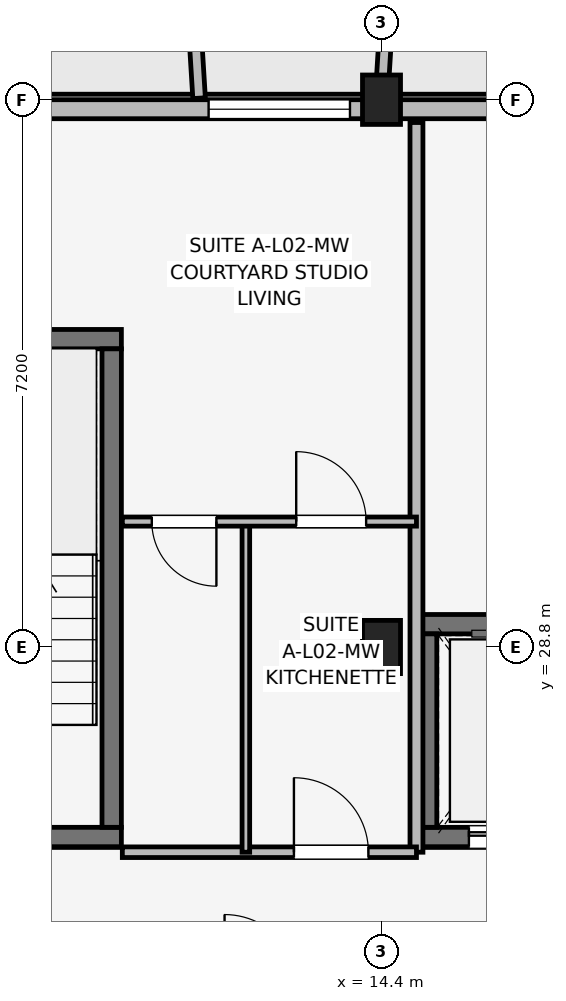
"""IFC4 building model, lengths in metres.
Left out: names, types, materials, properties, quantities, classifications, styles, units other than length and angle.
Written with IfcOpenShell. Run it as: python <this file> out.ifc"""

import sys

from ifc_helpers import new_model, si_unit, direction, frame, frame_2d, origin, origin_2d, place, context, subcontext, project, spatial, rectangle, extrude, element, fill, save


model = new_model("IFC4")
c1 = context("Model", 3, precision=1e-05, world=origin(), true_north=direction((0.0, 1.0)))
c2 = subcontext(c1, "Body", "Model", "MODEL_VIEW")
j1 = project(units=[si_unit("LENGTHUNIT", "METRE"), si_unit("PLANEANGLEUNIT", "RADIAN")], contexts=[c1])
p1 = place(None, origin())
s1 = spatial("IfcSite", under=j1, at=p1, CompositionType="ELEMENT")
p2 = place(p1, origin())
s2 = spatial("IfcBuilding", under=s1, at=p2, CompositionType="ELEMENT")
p3 = place(p2, frame((0.0, 0.0, 8.7)))
s3 = spatial("IfcBuildingStorey", under=s2, at=p3, CompositionType="ELEMENT", Elevation=8.7)
p4 = place(p3, frame((14.4, 28.8, 0.0), z_axis=(0.0, 0.0, 1.0), x_axis=(1.0, 0.0, 0.0)))
e1 = element("IfcColumn", 1, at=p4, inside=s3, PredefinedType="COLUMN", context=c2, shape_type="SweptSolid", body=[
    extrude(rectangle(XDim=0.5, YDim=0.7, at=origin_2d()), origin(), (0.0, 0.0, 1.0), 3.15),
])
p5 = place(p3, frame((14.4, 36.0, 0.0), z_axis=(0.0, 0.0, 1.0), x_axis=(1.0, 0.0, 0.0)))
e2 = element("IfcColumn", 2, at=p5, inside=s3, PredefinedType="COLUMN", context=c2, shape_type="SweptSolid", body=[
    extrude(rectangle(XDim=0.5, YDim=0.65, at=origin_2d()), origin(), (0.0, 0.0, 1.0), 3.15),
])
p6 = place(p3, frame((7.673, 26.3, 0.0), z_axis=(0.0, 0.0, 1.0), x_axis=(1.0, 0.0, 0.0)))
e3 = element("IfcWall", 3, at=p6, inside=s3, PredefinedType="SHEAR", context=c2, shape_type="SweptSolid", body=[
    extrude(rectangle(XDim=3.305, YDim=0.255, at=frame_2d((1.652, 0.0))), origin(), (0.0, 0.0, 1.0), 3.15),
])
p7 = place(p6, frame((2.177, 0.0, 0.0), z_axis=(0.0, 0.0, 1.0), x_axis=(-1.0, 0.0, 0.0)))
e4 = element("IfcOpeningElement", 4, at=p7, cuts=e3, PredefinedType="OPENING", context=c2, shape_type="SweptSolid", body=[
    extrude(rectangle(XDim=1.05, YDim=2.12, at=frame_2d((0.525, 1.06))), frame((0.0, 0.137, 0.0), z_axis=(0.0, -1.0, 0.0), x_axis=(1.0, 0.0, 0.0)), (0.0, 0.0, 1.0), 0.275),
])
p8 = place(p3, frame((7.673, 32.85, 0.0), z_axis=(0.0, 0.0, 1.0), x_axis=(1.0, 0.0, 0.0)))
e5 = element("IfcWall", 5, at=p8, inside=s3, PredefinedType="SHEAR", context=c2, shape_type="SweptSolid", body=[
    extrude(rectangle(XDim=3.305, YDim=0.255, at=frame_2d((1.652, 0.0))), origin(), (0.0, 0.0, 1.0), 3.15),
])
p9 = place(p3, frame((10.85, 26.427, 0.0), z_axis=(0.0, 0.0, 1.0), x_axis=(0.0, 1.0, 0.0)))
e6 = element("IfcWall", 6, at=p9, inside=s3, PredefinedType="SHEAR", context=c2, shape_type="SweptSolid", body=[
    extrude(rectangle(XDim=6.295, YDim=0.255, at=frame_2d((3.147, 0.0))), origin(), (0.0, 0.0, 1.0), 3.15),
])
p10 = place(p3, frame((14.873, 26.3, 0.0), z_axis=(0.0, 0.0, 1.0), x_axis=(1.0, 0.0, 0.0)))
e7 = element("IfcWall", 7, at=p10, inside=s3, PredefinedType="SHEAR", context=c2, shape_type="SweptSolid", body=[
    extrude(rectangle(XDim=2.455, YDim=0.255, at=frame_2d((1.228, 0.0))), origin(), (0.0, 0.0, 1.0), 3.15),
])
p11 = place(p10, frame((0.677, 0.0, 0.0)))
e8 = element("IfcOpeningElement", 8, at=p11, cuts=e7, PredefinedType="OPENING", context=c2, shape_type="SweptSolid", body=[
    extrude(rectangle(XDim=1.1, YDim=2.15, at=frame_2d((0.55, 1.075))), frame((0.0, 0.137, 0.0), z_axis=(0.0, -1.0, 0.0), x_axis=(1.0, 0.0, 0.0)), (0.0, 0.0, 1.0), 0.275),
])
p12 = place(p3, frame((14.873, 29.1, 0.0), z_axis=(0.0, 0.0, 1.0), x_axis=(1.0, 0.0, 0.0)))
e9 = element("IfcWall", 9, at=p12, inside=s3, PredefinedType="SHEAR", context=c2, shape_type="SweptSolid", body=[
    extrude(rectangle(XDim=2.455, YDim=0.255, at=frame_2d((1.228, 0.0))), origin(), (0.0, 0.0, 1.0), 3.15),
])
p13 = place(p3, frame((15.0, 26.427, 0.0), z_axis=(0.0, 0.0, 1.0), x_axis=(0.0, 1.0, 0.0)))
e10 = element("IfcWall", 10, at=p13, inside=s3, PredefinedType="SHEAR", context=c2, shape_type="SweptSolid", body=[
    extrude(rectangle(XDim=2.545, YDim=0.255, at=frame_2d((1.272, 0.0))), origin(), (0.0, 0.0, 1.0), 3.15),
])
p14 = place(p3, frame((32.6, 35.875, 0.0), z_axis=(0.0, 0.0, 1.0), x_axis=(-1.0, 0.0, 0.0)))
e11 = element("IfcWall", 11, at=p14, inside=s3, PredefinedType="SOLIDWALL", context=c2, shape_type="SweptSolid", body=[
    extrude(rectangle(XDim=29.2, YDim=0.25, at=frame_2d((14.6, 0.0))), origin(), (0.0, 0.0, 1.0), 2.43),
])
p15 = place(p14, frame((27.55, 0.0, 0.0), z_axis=(0.0, 0.0, 1.0), x_axis=(-1.0, 0.0, 0.0)))
e12 = element("IfcOpeningElement", 12, at=p15, cuts=e11, PredefinedType="OPENING", context=c2, shape_type="SweptSolid", body=[
    extrude(rectangle(XDim=1.5, YDim=2.15, at=frame_2d((0.75, 1.075))), frame((0.0, 0.135, 0.0), z_axis=(0.0, -1.0, 0.0), x_axis=(1.0, 0.0, 0.0)), (0.0, 0.0, 1.0), 0.27),
])
p16 = place(p14, frame((3.15, 0.0, 0.0), z_axis=(0.0, 0.0, 1.0), x_axis=(-1.0, 0.0, 0.0)))
e13 = element("IfcOpeningElement", 13, at=p16, cuts=e11, PredefinedType="OPENING", context=c2, shape_type="SweptSolid", body=[
    extrude(rectangle(XDim=1.5, YDim=2.15, at=frame_2d((0.75, 1.075))), frame((0.0, 0.135, 0.0), z_axis=(0.0, -1.0, 0.0), x_axis=(1.0, 0.0, 0.0)), (0.0, 0.0, 1.0), 0.27),
])
p17 = place(p14, frame((14.025, 0.0, 0.5)))
e14 = element("IfcOpeningElement", 14, at=p17, cuts=e11, PredefinedType="OPENING", context=c2, shape_type="SweptSolid", body=[
    extrude(rectangle(XDim=1.15, YDim=1.68, at=frame_2d((0.575, 0.84))), frame((0.0, 0.135, 0.0), z_axis=(0.0, -1.0, 0.0), x_axis=(1.0, 0.0, 0.0)), (0.0, 0.0, 1.0), 0.27),
])
p18 = place(p14, frame((8.725, 0.0, 0.7)))
e15 = element("IfcOpeningElement", 15, at=p18, cuts=e11, PredefinedType="OPENING", context=c2, shape_type="SweptSolid", body=[
    extrude(rectangle(XDim=1.86, YDim=1.6, at=frame_2d((0.93, 0.8))), frame((0.0, 0.135, 0.0), z_axis=(0.0, -1.0, 0.0), x_axis=(1.0, 0.0, 0.0)), (0.0, 0.0, 1.0), 0.27),
])
p19 = place(p14, frame((18.615, 0.0, 0.7)))
e16 = element("IfcOpeningElement", 16, at=p19, cuts=e11, PredefinedType="OPENING", context=c2, shape_type="SweptSolid", body=[
    extrude(rectangle(XDim=1.86, YDim=1.6, at=frame_2d((0.93, 0.8))), frame((0.0, 0.135, 0.0), z_axis=(0.0, -1.0, 0.0), x_axis=(1.0, 0.0, 0.0)), (0.0, 0.0, 1.0), 0.27),
])
p20 = place(p3, frame((12.0, 36.02, 0.0), z_axis=(0.0, 0.0, 1.0), x_axis=(-0.061170732449, 0.998127317276, 0.0)))
e17 = element("IfcWall", 17, at=p20, inside=s3, PredefinedType="ELEMENTEDWALL", context=c2, shape_type="SweptSolid", body=[
    extrude(rectangle(XDim=1.964, YDim=0.165, at=frame_2d((0.982, 0.0))), origin(), (0.0, 0.0, 1.0), 2.55),
])
p21 = place(p3, frame((14.4, 36.02, 0.0), z_axis=(0.0, 0.0, 1.0), x_axis=(0.061170732449, 0.998127317276, 0.0)))
e18 = element("IfcWall", 18, at=p21, inside=s3, PredefinedType="ELEMENTEDWALL", context=c2, shape_type="SweptSolid", body=[
    extrude(rectangle(XDim=1.964, YDim=0.165, at=frame_2d((0.982, 0.0))), origin(), (0.0, 0.0, 1.0), 2.95),
])
p22 = place(p3, frame((14.86, 26.1, 0.0), z_axis=(0.0, 0.0, 1.0), x_axis=(0.0, 1.0, 0.0)))
e19 = element("IfcWall", 19, at=p22, inside=s3, PredefinedType="PARTITIONING", context=c2, shape_type="SweptSolid", body=[
    extrude(rectangle(XDim=9.6, YDim=0.17, at=frame_2d((4.8, 0.0))), origin(), (0.0, 0.0, 1.0), 2.38),
])
p23 = place(p3, frame((10.99, 26.1, 0.0), z_axis=(0.0, 0.0, 1.0), x_axis=(1.0, 0.0, 0.0)))
e20 = element("IfcWall", 20, at=p23, inside=s3, PredefinedType="PARTITIONING", context=c2, shape_type="SweptSolid", body=[
    extrude(rectangle(XDim=3.87, YDim=0.14, at=frame_2d((1.935, 0.0))), origin(), (0.0, 0.0, 1.0), 2.38),
])
p24 = place(p23, frame((2.258, 0.0, 0.0)))
e21 = element("IfcOpeningElement", 21, at=p24, cuts=e20, PredefinedType="OPENING", context=c2, shape_type="SweptSolid", body=[
    extrude(rectangle(XDim=0.98, YDim=2.1, at=frame_2d((0.49, 1.05))), frame((0.0, 0.08, 0.0), z_axis=(0.0, -1.0, 0.0), x_axis=(1.0, 0.0, 0.0)), (0.0, 0.0, 1.0), 0.16),
])
p25 = place(p3, frame((12.615, 26.1, 0.0), z_axis=(0.0, 0.0, 1.0), x_axis=(0.0, 1.0, 0.0)))
e22 = element("IfcWall", 22, at=p25, inside=s3, PredefinedType="PARTITIONING", context=c2, shape_type="SweptSolid", body=[
    extrude(rectangle(XDim=4.35, YDim=0.1, at=frame_2d((2.175, 0.0))), origin(), (0.0, 0.0, 1.0), 2.375),
])
p26 = place(p3, frame((10.99, 30.45, 0.0), z_axis=(0.0, 0.0, 1.0), x_axis=(1.0, 0.0, 0.0)))
e23 = element("IfcWall", 23, at=p26, inside=s3, PredefinedType="PARTITIONING", context=c2, shape_type="SweptSolid", body=[
    extrude(rectangle(XDim=3.87, YDim=0.12, at=frame_2d((1.935, 0.0))), origin(), (0.0, 0.0, 1.0), 2.38),
])
p27 = place(p26, frame((1.238, 0.0, 0.0), z_axis=(0.0, 0.0, 1.0), x_axis=(-1.0, 0.0, 0.0)))
e24 = element("IfcOpeningElement", 24, at=p27, cuts=e23, PredefinedType="OPENING", context=c2, shape_type="SweptSolid", body=[
    extrude(rectangle(XDim=0.85, YDim=2.08, at=frame_2d((0.425, 1.04))), frame((0.0, 0.07, 0.0), z_axis=(0.0, -1.0, 0.0), x_axis=(1.0, 0.0, 0.0)), (0.0, 0.0, 1.0), 0.14),
])
p28 = place(p26, frame((2.288, 0.0, 0.0)))
e25 = element("IfcOpeningElement", 25, at=p28, cuts=e23, PredefinedType="OPENING", context=c2, shape_type="SweptSolid", body=[
    extrude(rectangle(XDim=0.92, YDim=2.08, at=frame_2d((0.46, 1.04))), frame((0.0, 0.07, 0.0), z_axis=(0.0, -1.0, 0.0), x_axis=(1.0, 0.0, 0.0)), (0.0, 0.0, 1.0), 0.14),
])
p29 = place(p19, origin())
e26 = element("IfcWindow", 26, at=p29, inside=s3, PartitioningType="SINGLE_PANEL", PredefinedType="WINDOW", context=c2, shape_type="SweptSolid", body=[
    extrude(rectangle(XDim=1.86, YDim=1.6, at=frame_2d((0.93, 0.8))), frame((0.0, 0.03, 0.0), z_axis=(0.0, -1.0, 0.0), x_axis=(1.0, 0.0, 0.0)), (0.0, 0.0, 1.0), 0.06),
])
fill(e16, e26)
p30 = place(p24, origin())
e27 = element("IfcDoor", 27, at=p30, inside=s3, OperationType="SINGLE_SWING_LEFT", PredefinedType="DOOR", context=c2, shape_type="SweptSolid", body=[
    extrude(rectangle(XDim=0.98, YDim=2.1, at=frame_2d((0.49, 1.05))), frame((0.0, 0.025, 0.0), z_axis=(0.0, -1.0, 0.0), x_axis=(1.0, 0.0, 0.0)), (0.0, 0.0, 1.0), 0.05),
])
fill(e21, e27)
p31 = place(p27, origin())
e28 = element("IfcDoor", 28, at=p31, inside=s3, OperationType="SINGLE_SWING_RIGHT", PredefinedType="DOOR", context=c2, shape_type="SweptSolid", body=[
    extrude(rectangle(XDim=0.85, YDim=2.08, at=frame_2d((0.425, 1.04))), frame((0.0, 0.025, 0.0), z_axis=(0.0, -1.0, 0.0), x_axis=(1.0, 0.0, 0.0)), (0.0, 0.0, 1.0), 0.05),
])
fill(e24, e28)
p32 = place(p28, origin())
e29 = element("IfcDoor", 29, at=p32, inside=s3, OperationType="SINGLE_SWING_LEFT", PredefinedType="DOOR", context=c2, shape_type="SweptSolid", body=[
    extrude(rectangle(XDim=0.92, YDim=2.08, at=frame_2d((0.46, 1.04))), frame((0.0, 0.025, 0.0), z_axis=(0.0, -1.0, 0.0), x_axis=(1.0, 0.0, 0.0)), (0.0, 0.0, 1.0), 0.05),
])
fill(e25, e29)
p33 = place(p11, origin())
e30 = element("IfcDoor", 30, at=p33, inside=s3, OperationType="SLIDING_TO_LEFT", PredefinedType="DOOR", context=c2, shape_type="SweptSolid", body=[
    extrude(rectangle(XDim=1.1, YDim=2.15, at=frame_2d((0.55, 1.075))), frame((0.0, 0.025, 0.0), z_axis=(0.0, -1.0, 0.0), x_axis=(1.0, 0.0, 0.0)), (0.0, 0.0, 1.0), 0.05),
])
fill(e8, e30)
save(model, sys.argv[1])
